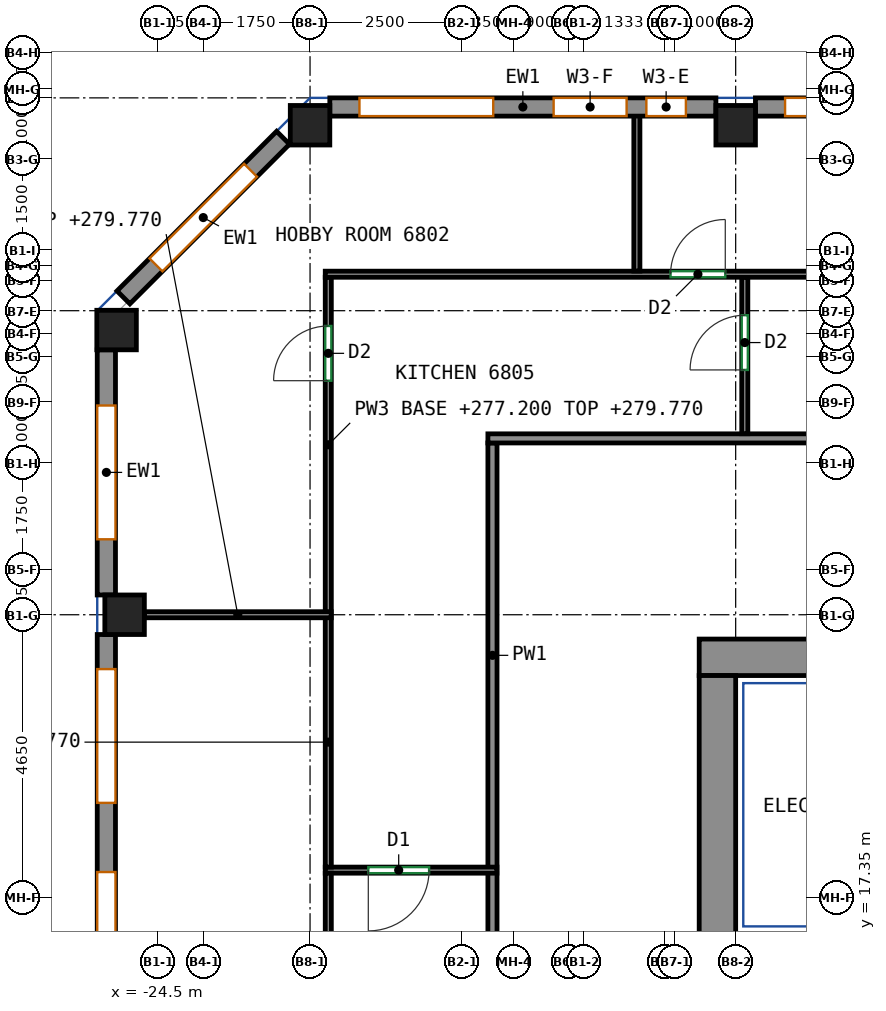
"""IFC4 building model, lengths in metres.
Left out: names, types, materials, properties, quantities, classifications, styles, units other than length and angle.
Written with IfcOpenShell. Run it as: python <this file> out.ifc"""

import sys

from ifc_helpers import new_model, si_unit, direction, frame, frame_2d, origin, origin_2d, place, context, subcontext, project, spatial, rectangle, extrude, source, transform, mapped, element, fill, save


model = new_model("IFC4")
c1 = context("Model", 3, precision=1e-05, world=origin(), true_north=direction((0.0, 1.0)))
c2 = subcontext(c1, "Body", "Model", "MODEL_VIEW")
j1 = project(units=[si_unit("LENGTHUNIT", "METRE"), si_unit("PLANEANGLEUNIT", "RADIAN")], contexts=[c1])
p1 = place(None, origin())
s1 = spatial("IfcSite", under=j1, at=p1, CompositionType="ELEMENT")
p2 = place(p1, origin())
s2 = spatial("IfcBuilding", under=s1, at=p2, CompositionType="ELEMENT")
p3 = place(p2, frame((0.0, 0.0, 277.2)))
s3 = spatial("IfcBuildingStorey", under=s2, at=p3, CompositionType="ELEMENT", Elevation=277.2)
m1 = source(origin(), c2, "Body", "SweptSolid", [
    extrude(rectangle(XDim=0.65, YDim=0.65, at=origin_2d()), origin(), (0.0, 0.0, 1.0), 3.12),
])
for number, where, z_axis, x_axis in (
    (1, (-25.182, 26.682, 0.0), (0.0, 0.0, 1.0), (1.0, 0.0, 0.0)),
    (2, (-25.05, 22.0, 0.0), (0.0, 0.0, 1.0), (1.0, 0.0, 0.0)),
    (3, (-22.0, 30.05, 0.0), (0.0, 0.0, 1.0), (1.0, 0.0, 0.0)),
    (4, (-15.0, 30.05, 0.0), (0.0, 0.0, 1.0), (1.0, 0.0, 0.0)),
):
    element("IfcColumn", number, at=place(p3, frame(where, z_axis=z_axis, x_axis=x_axis)), inside=s3, PredefinedType="COLUMN", context=c2, shape_type="MappedRepresentation", body=[
        mapped(m1, transform((0.0, 0.0, 0.0))),
    ])
m2 = source(origin(), c2, "Body", "SweptSolid", [
    extrude(rectangle(XDim=33.3, YDim=0.6, at=frame_2d((16.65, 0.0))), origin(), (0.0, 0.0, 1.0), 3.12),
])
p4 = place(p3, frame((-15.6, 21.3, 0.0), z_axis=(0.0, 0.0, 1.0), x_axis=(1.0, 0.0, 0.0)))
e5 = element("IfcWall", 5, at=p4, inside=s3, PredefinedType="SHEAR", context=c2, shape_type="MappedRepresentation", body=[
    mapped(m2, transform((0.0, 0.0, 0.0))),
])
p5 = place(p4, frame((5.708, 0.0, 0.0)))
e6 = element("IfcOpeningElement", 6, at=p5, cuts=e5, PredefinedType="OPENING", context=c2, shape_type="SweptSolid", body=[
    extrude(rectangle(XDim=0.9, YDim=2.1, at=frame_2d((0.45, 1.05))), frame((0.0, 0.31, 0.0), z_axis=(0.0, -1.0, 0.0), x_axis=(1.0, 0.0, 0.0)), (0.0, 0.0, 1.0), 0.62),
])
p6 = place(p4, frame((10.773, 0.0, 0.0)))
e7 = element("IfcOpeningElement", 7, at=p6, cuts=e5, PredefinedType="OPENING", context=c2, shape_type="SweptSolid", body=[
    extrude(rectangle(XDim=0.9, YDim=2.1, at=frame_2d((0.45, 1.05))), frame((0.0, 0.31, 0.0), z_axis=(0.0, -1.0, 0.0), x_axis=(1.0, 0.0, 0.0)), (0.0, 0.0, 1.0), 0.62),
])
p7 = place(p4, frame((15.838, 0.0, 0.0)))
e8 = element("IfcOpeningElement", 8, at=p7, cuts=e5, PredefinedType="OPENING", context=c2, shape_type="SweptSolid", body=[
    extrude(rectangle(XDim=0.9, YDim=2.1, at=frame_2d((0.45, 1.05))), frame((0.0, 0.31, 0.0), z_axis=(0.0, -1.0, 0.0), x_axis=(1.0, 0.0, 0.0)), (0.0, 0.0, 1.0), 0.62),
])
p8 = place(p4, frame((21.493, 0.0, 0.0)))
e9 = element("IfcOpeningElement", 9, at=p8, cuts=e5, PredefinedType="OPENING", context=c2, shape_type="SweptSolid", body=[
    extrude(rectangle(XDim=0.9, YDim=2.1, at=frame_2d((0.45, 1.05))), frame((0.0, 0.31, 0.0), z_axis=(0.0, -1.0, 0.0), x_axis=(1.0, 0.0, 0.0)), (0.0, 0.0, 1.0), 0.62),
])
p9 = place(p4, frame((26.92, 0.0, 0.0)))
e10 = element("IfcOpeningElement", 10, at=p9, cuts=e5, PredefinedType="OPENING", context=c2, shape_type="SweptSolid", body=[
    extrude(rectangle(XDim=0.9, YDim=2.1, at=frame_2d((0.45, 1.05))), frame((0.0, 0.31, 0.0), z_axis=(0.0, -1.0, 0.0), x_axis=(1.0, 0.0, 0.0)), (0.0, 0.0, 1.0), 0.62),
])
p10 = place(p4, frame((2.125, 0.0, 0.0)))
e11 = element("IfcOpeningElement", 11, at=p10, cuts=e5, PredefinedType="OPENING", context=c2, shape_type="SweptSolid", body=[
    extrude(rectangle(XDim=0.9, YDim=2.1, at=frame_2d((0.45, 1.05))), frame((0.0, 0.31, 0.0), z_axis=(0.0, -1.0, 0.0), x_axis=(1.0, 0.0, 0.0)), (0.0, 0.0, 1.0), 0.62),
])
p11 = place(p4, frame((30.275, 0.0, 0.0)))
e12 = element("IfcOpeningElement", 12, at=p11, cuts=e5, PredefinedType="OPENING", context=c2, shape_type="SweptSolid", body=[
    extrude(rectangle(XDim=0.9, YDim=2.1, at=frame_2d((0.45, 1.05))), frame((0.0, 0.31, 0.0), z_axis=(0.0, -1.0, 0.0), x_axis=(1.0, 0.0, 0.0)), (0.0, 0.0, 1.0), 0.62),
])
m3 = source(origin(), c2, "Body", "SweptSolid", [
    extrude(rectangle(XDim=12.0, YDim=0.6, at=frame_2d((6.0, 0.0))), origin(), (0.0, 0.0, 1.0), 3.12),
])
p12 = place(p3, frame((-15.3, 9.0, 0.0), z_axis=(0.0, 0.0, 1.0), x_axis=(0.0, 1.0, 0.0)))
e13 = element("IfcWall", 13, at=p12, inside=s3, PredefinedType="SHEAR", context=c2, shape_type="MappedRepresentation", body=[
    mapped(m3, transform((0.0, 0.0, 0.0))),
])
m4 = source(origin(), c2, "Body", "SweptSolid", [
    extrude(rectangle(XDim=6.35, YDim=0.3, at=frame_2d((3.175, 0.0))), origin(), (0.0, 0.0, 1.0), 3.12),
])
p13 = place(p3, frame((-8.325, 30.35, 0.0), z_axis=(0.0, 0.0, 1.0), x_axis=(-1.0, 0.0, 0.0)))
e14 = element("IfcWall", 14, at=p13, inside=s3, PredefinedType="SOLIDWALL", context=c2, shape_type="MappedRepresentation", body=[
    mapped(m4, transform((0.0, 0.0, 0.0))),
])
p14 = place(p13, frame((0.488, 0.0, 0.8)))
e15 = element("IfcOpeningElement", 15, at=p14, cuts=e14, PredefinedType="OPENING", context=c2, shape_type="SweptSolid", body=[
    extrude(rectangle(XDim=2.2, YDim=2.05, at=frame_2d((1.1, 1.025))), frame((0.0, 0.16, 0.0), z_axis=(0.0, -1.0, 0.0), x_axis=(1.0, 0.0, 0.0)), (0.0, 0.0, 1.0), 0.32),
])
p15 = place(p13, frame((3.663, 0.0, 0.8)))
e16 = element("IfcOpeningElement", 16, at=p15, cuts=e14, PredefinedType="OPENING", context=c2, shape_type="SweptSolid", body=[
    extrude(rectangle(XDim=2.2, YDim=2.05, at=frame_2d((1.1, 1.025))), frame((0.0, 0.16, 0.0), z_axis=(0.0, -1.0, 0.0), x_axis=(1.0, 0.0, 0.0)), (0.0, 0.0, 1.0), 0.32),
])
p16 = place(p3, frame((-15.325, 30.35, 0.0), z_axis=(0.0, 0.0, 1.0), x_axis=(-1.0, 0.0, 0.0)))
e17 = element("IfcWall", 17, at=p16, inside=s3, PredefinedType="SOLIDWALL", context=c2, shape_type="MappedRepresentation", body=[
    mapped(m4, transform((0.0, 0.0, 0.0))),
])
p17 = place(p16, frame((0.494, 0.0, 0.8)))
e18 = element("IfcOpeningElement", 18, at=p17, cuts=e17, PredefinedType="OPENING", context=c2, shape_type="SweptSolid", body=[
    extrude(rectangle(XDim=0.65, YDim=2.05, at=frame_2d((0.325, 1.025))), frame((0.0, 0.16, 0.0), z_axis=(0.0, -1.0, 0.0), x_axis=(1.0, 0.0, 0.0)), (0.0, 0.0, 1.0), 0.32),
])
p18 = place(p16, frame((3.663, 0.0, 0.8)))
e19 = element("IfcOpeningElement", 19, at=p18, cuts=e17, PredefinedType="OPENING", context=c2, shape_type="SweptSolid", body=[
    extrude(rectangle(XDim=2.2, YDim=2.05, at=frame_2d((1.1, 1.025))), frame((0.0, 0.16, 0.0), z_axis=(0.0, -1.0, 0.0), x_axis=(1.0, 0.0, 0.0)), (0.0, 0.0, 1.0), 0.32),
])
p19 = place(p16, frame((1.469, 0.0, 0.8)))
e20 = element("IfcOpeningElement", 20, at=p19, cuts=e17, PredefinedType="OPENING", context=c2, shape_type="SweptSolid", body=[
    extrude(rectangle(XDim=1.2, YDim=2.05, at=frame_2d((0.6, 1.025))), frame((0.0, 0.16, 0.0), z_axis=(0.0, -1.0, 0.0), x_axis=(1.0, 0.0, 0.0)), (0.0, 0.0, 1.0), 0.32),
])
m5 = source(origin(), c2, "Body", "SweptSolid", [
    extrude(rectangle(XDim=3.712, YDim=0.3, at=frame_2d((1.856, 0.0))), origin(), (0.0, 0.0, 1.0), 3.12),
])
p20 = place(p3, frame((-22.444, 29.844, 0.0), z_axis=(0.0, 0.0, 1.0), x_axis=(-0.707106781187, -0.707106781187, 0.0)))
e21 = element("IfcWall", 21, at=p20, inside=s3, PredefinedType="SOLIDWALL", context=c2, shape_type="MappedRepresentation", body=[
    mapped(m5, transform((0.0, 0.0, 0.0))),
])
p21 = place(p20, frame((0.756, 0.0, 0.8)))
e22 = element("IfcOpeningElement", 22, at=p21, cuts=e21, PredefinedType="OPENING", context=c2, shape_type="SweptSolid", body=[
    extrude(rectangle(XDim=2.2, YDim=2.05, at=frame_2d((1.1, 1.025))), frame((0.0, 0.16, 0.0), z_axis=(0.0, -1.0, 0.0), x_axis=(1.0, 0.0, 0.0)), (0.0, 0.0, 1.0), 0.32),
])
m6 = source(origin(), c2, "Body", "SweptSolid", [
    extrude(rectangle(XDim=4.032, YDim=0.3, at=frame_2d((2.016, 0.0))), origin(), (0.0, 0.0, 1.0), 3.12),
])
p22 = place(p3, frame((-25.35, 26.357, 0.0), z_axis=(0.0, 0.0, 1.0), x_axis=(0.0, -1.0, 0.0)))
e23 = element("IfcWall", 23, at=p22, inside=s3, PredefinedType="SOLIDWALL", context=c2, shape_type="MappedRepresentation", body=[
    mapped(m6, transform((0.0, 0.0, 0.0))),
])
p23 = place(p22, frame((0.916, 0.0, 0.8)))
e24 = element("IfcOpeningElement", 24, at=p23, cuts=e23, PredefinedType="OPENING", context=c2, shape_type="SweptSolid", body=[
    extrude(rectangle(XDim=2.2, YDim=2.05, at=frame_2d((1.1, 1.025))), frame((0.0, 0.16, 0.0), z_axis=(0.0, -1.0, 0.0), x_axis=(1.0, 0.0, 0.0)), (0.0, 0.0, 1.0), 0.32),
])
m7 = source(origin(), c2, "Body", "SweptSolid", [
    extrude(rectangle(XDim=13.35, YDim=0.3, at=frame_2d((6.675, 0.0))), origin(), (0.0, 0.0, 1.0), 3.12),
])
p24 = place(p3, frame((-25.35, 21.675, 0.0), z_axis=(0.0, 0.0, 1.0), x_axis=(0.0, -1.0, 0.0)))
e25 = element("IfcWall", 25, at=p24, inside=s3, PredefinedType="SOLIDWALL", context=c2, shape_type="MappedRepresentation", body=[
    mapped(m7, transform((0.0, 0.0, 0.0))),
])
p25 = place(p24, frame((0.569, 0.0, 0.8)))
e26 = element("IfcOpeningElement", 26, at=p25, cuts=e25, PredefinedType="OPENING", context=c2, shape_type="SweptSolid", body=[
    extrude(rectangle(XDim=2.2, YDim=2.05, at=frame_2d((1.1, 1.025))), frame((0.0, 0.16, 0.0), z_axis=(0.0, -1.0, 0.0), x_axis=(1.0, 0.0, 0.0)), (0.0, 0.0, 1.0), 0.32),
])
p26 = place(p24, frame((3.906, 0.0, 0.8)))
e27 = element("IfcOpeningElement", 27, at=p26, cuts=e25, PredefinedType="OPENING", context=c2, shape_type="SweptSolid", body=[
    extrude(rectangle(XDim=2.2, YDim=2.05, at=frame_2d((1.1, 1.025))), frame((0.0, 0.16, 0.0), z_axis=(0.0, -1.0, 0.0), x_axis=(1.0, 0.0, 0.0)), (0.0, 0.0, 1.0), 0.32),
])
p27 = place(p24, frame((7.244, 0.0, 0.8)))
e28 = element("IfcOpeningElement", 28, at=p27, cuts=e25, PredefinedType="OPENING", context=c2, shape_type="SweptSolid", body=[
    extrude(rectangle(XDim=2.2, YDim=2.05, at=frame_2d((1.1, 1.025))), frame((0.0, 0.16, 0.0), z_axis=(0.0, -1.0, 0.0), x_axis=(1.0, 0.0, 0.0)), (0.0, 0.0, 1.0), 0.32),
])
p28 = place(p24, frame((10.581, 0.0, 0.8)))
e29 = element("IfcOpeningElement", 29, at=p28, cuts=e25, PredefinedType="OPENING", context=c2, shape_type="SweptSolid", body=[
    extrude(rectangle(XDim=2.2, YDim=2.05, at=frame_2d((1.1, 1.025))), frame((0.0, 0.16, 0.0), z_axis=(0.0, -1.0, 0.0), x_axis=(1.0, 0.0, 0.0)), (0.0, 0.0, 1.0), 0.32),
])
p29 = place(p3, frame((-19.0, 8.09, 0.0), z_axis=(0.0, 0.0, 1.0), x_axis=(0.0, 1.0, 0.0)))
e30 = element("IfcWall", 30, at=p29, inside=s3, PredefinedType="PARTITIONING", context=c2, shape_type="SweptSolid", body=[
    extrude(rectangle(XDim=9.67, YDim=0.15, at=frame_2d((4.835, 0.0))), origin(), (0.0, 0.0, 1.0), 3.12),
])
p30 = place(p29, frame((3.629, 0.0, 0.0)))
e31 = element("IfcOpeningElement", 31, at=p30, cuts=e30, PredefinedType="OPENING", context=c2, shape_type="SweptSolid", body=[
    extrude(rectangle(XDim=1.0, YDim=2.1, at=frame_2d((0.5, 1.05))), frame((0.0, 0.085, 0.0), z_axis=(0.0, -1.0, 0.0), x_axis=(1.0, 0.0, 0.0)), (0.0, 0.0, 1.0), 0.17),
])
p31 = place(p3, frame((-19.0, 17.84, 0.0), z_axis=(0.0, 0.0, 1.0), x_axis=(0.0, 1.0, 0.0)))
e32 = element("IfcWall", 32, at=p31, inside=s3, PredefinedType="PARTITIONING", context=c2, shape_type="SweptSolid", body=[
    extrude(rectangle(XDim=6.985, YDim=0.15, at=frame_2d((3.492, 0.0))), origin(), (0.0, 0.0, 1.0), 3.12),
])
p32 = place(p3, frame((-19.075, 24.9, 0.0), z_axis=(0.0, 0.0, 1.0), x_axis=(1.0, 0.0, 0.0)))
e33 = element("IfcWall", 33, at=p32, inside=s3, PredefinedType="PARTITIONING", context=c2, shape_type="SweptSolid", body=[
    extrude(rectangle(XDim=39.75, YDim=0.15, at=frame_2d((19.875, 0.0))), origin(), (0.0, 0.0, 1.0), 3.12),
])
p33 = place(p32, frame((11.365, 0.0, 0.0)))
e34 = element("IfcOpeningElement", 34, at=p33, cuts=e33, PredefinedType="OPENING", context=c2, shape_type="SweptSolid", body=[
    extrude(rectangle(XDim=1.0, YDim=2.1, at=frame_2d((0.5, 1.05))), frame((0.0, 0.085, 0.0), z_axis=(0.0, -1.0, 0.0), x_axis=(1.0, 0.0, 0.0)), (0.0, 0.0, 1.0), 0.17),
])
p34 = place(p32, frame((33.379, 0.0, 0.0)))
e35 = element("IfcOpeningElement", 35, at=p34, cuts=e33, PredefinedType="OPENING", context=c2, shape_type="SweptSolid", body=[
    extrude(rectangle(XDim=0.9, YDim=2.1, at=frame_2d((0.45, 1.05))), frame((0.0, 0.085, 0.0), z_axis=(0.0, -1.0, 0.0), x_axis=(1.0, 0.0, 0.0)), (0.0, 0.0, 1.0), 0.17),
])
p35 = place(p3, frame((-18.927, 17.8, 0.0), z_axis=(0.0, 0.0, 1.0), x_axis=(-1.0, 0.0, 0.0)))
e36 = element("IfcWall", 36, at=p35, inside=s3, PredefinedType="PARTITIONING", context=c2, shape_type="SweptSolid", body=[
    extrude(rectangle(XDim=2.823, YDim=0.1, at=frame_2d((1.412, 0.0))), origin(), (0.0, 0.0, 1.0), 3.12),
])
p36 = place(p35, frame((1.115, 0.0, 0.0)))
e37 = element("IfcOpeningElement", 37, at=p36, cuts=e36, PredefinedType="OPENING", context=c2, shape_type="SweptSolid", body=[
    extrude(rectangle(XDim=1.0, YDim=2.1, at=frame_2d((0.5, 1.05))), frame((0.0, 0.06, 0.0), z_axis=(0.0, -1.0, 0.0), x_axis=(1.0, 0.0, 0.0)), (0.0, 0.0, 1.0), 0.12),
])
p37 = place(p3, frame((-21.7, 8.1, 0.0), z_axis=(0.0, 0.0, 1.0), x_axis=(0.0, 1.0, 0.0)))
e38 = element("IfcWall", 38, at=p37, inside=s3, PredefinedType="PARTITIONING", context=c2, shape_type="SweptSolid", body=[
    extrude(rectangle(XDim=9.65, YDim=0.1, at=frame_2d((4.825, 0.0))), origin(), (0.0, 0.0, 1.0), 2.57),
])
p38 = place(p37, frame((7.041, 0.0, 0.0)))
e39 = element("IfcOpeningElement", 39, at=p38, cuts=e38, PredefinedType="OPENING", context=c2, shape_type="SweptSolid", body=[
    extrude(rectangle(XDim=1.0, YDim=2.1, at=frame_2d((0.5, 1.05))), frame((0.0, 0.06, 0.0), z_axis=(0.0, -1.0, 0.0), x_axis=(1.0, 0.0, 0.0)), (0.0, 0.0, 1.0), 0.12),
])
p39 = place(p3, frame((-14.85, 24.977, 0.0), z_axis=(0.0, 0.0, 1.0), x_axis=(0.0, 1.0, 0.0)))
e40 = element("IfcWall", 40, at=p39, inside=s3, PredefinedType="PARTITIONING", context=c2, shape_type="SweptSolid", body=[
    extrude(rectangle(XDim=2.573, YDim=0.1, at=frame_2d((1.287, 0.0))), origin(), (0.0, 0.0, 1.0), 3.12),
])
p40 = place(p39, frame((1.049, 0.0, 0.0)))
e41 = element("IfcOpeningElement", 41, at=p40, cuts=e40, PredefinedType="OPENING", context=c2, shape_type="SweptSolid", body=[
    extrude(rectangle(XDim=0.9, YDim=2.1, at=frame_2d((0.45, 1.05))), frame((0.0, 0.06, 0.0), z_axis=(0.0, -1.0, 0.0), x_axis=(1.0, 0.0, 0.0)), (0.0, 0.0, 1.0), 0.12),
])
p41 = place(p3, frame((-21.7, 17.85, 0.0), z_axis=(0.0, 0.0, 1.0), x_axis=(0.0, 1.0, 0.0)))
e42 = element("IfcWall", 42, at=p41, inside=s3, PredefinedType="PARTITIONING", context=c2, shape_type="SweptSolid", body=[
    extrude(rectangle(XDim=4.11, YDim=0.1, at=frame_2d((2.055, 0.0))), origin(), (0.0, 0.0, 1.0), 2.57),
])
p42 = place(p3, frame((-21.7, 22.04, 0.0), z_axis=(0.0, 0.0, 1.0), x_axis=(0.0, 1.0, 0.0)))
e43 = element("IfcWall", 43, at=p42, inside=s3, PredefinedType="PARTITIONING", context=c2, shape_type="SweptSolid", body=[
    extrude(rectangle(XDim=5.51, YDim=0.1, at=frame_2d((2.755, 0.0))), origin(), (0.0, 0.0, 1.0), 2.57),
])
p43 = place(p42, frame((3.809, 0.0, 0.0)))
e44 = element("IfcOpeningElement", 44, at=p43, cuts=e43, PredefinedType="OPENING", context=c2, shape_type="SweptSolid", body=[
    extrude(rectangle(XDim=0.9, YDim=2.1, at=frame_2d((0.45, 1.05))), frame((0.0, 0.06, 0.0), z_axis=(0.0, -1.0, 0.0), x_axis=(1.0, 0.0, 0.0)), (0.0, 0.0, 1.0), 0.12),
])
p44 = place(p3, frame((-21.75, 27.6, 0.0), z_axis=(0.0, 0.0, 1.0), x_axis=(1.0, 0.0, 0.0)))
e45 = element("IfcWall", 45, at=p44, inside=s3, PredefinedType="PARTITIONING", context=c2, shape_type="SweptSolid", body=[
    extrude(rectangle(XDim=13.85, YDim=0.1, at=frame_2d((6.925, 0.0))), origin(), (0.0, 0.0, 1.0), 3.12),
])
p45 = place(p44, frame((5.679, 0.0, 0.0)))
e46 = element("IfcOpeningElement", 46, at=p45, cuts=e45, PredefinedType="OPENING", context=c2, shape_type="SweptSolid", body=[
    extrude(rectangle(XDim=0.9, YDim=2.1, at=frame_2d((0.45, 1.05))), frame((0.0, 0.06, 0.0), z_axis=(0.0, -1.0, 0.0), x_axis=(1.0, 0.0, 0.0)), (0.0, 0.0, 1.0), 0.12),
])
p46 = place(p3, frame((-21.652, 22.0, 0.0), z_axis=(0.0, 0.0, 1.0), x_axis=(-1.0, 0.0, 0.0)))
e47 = element("IfcWall", 47, at=p46, inside=s3, PredefinedType="PARTITIONING", context=c2, shape_type="SweptSolid", body=[
    extrude(rectangle(XDim=3.073, YDim=0.1, at=frame_2d((1.537, 0.0))), origin(), (0.0, 0.0, 1.0), 2.57),
])
p47 = place(p3, frame((-16.625, 27.652, 0.0), z_axis=(0.0, 0.0, 1.0), x_axis=(0.0, 1.0, 0.0)))
e48 = element("IfcWall", 48, at=p47, inside=s3, PredefinedType="PARTITIONING", context=c2, shape_type="SweptSolid", body=[
    extrude(rectangle(XDim=2.598, YDim=0.1, at=frame_2d((1.299, 0.0))), origin(), (0.0, 0.0, 1.0), 3.12),
])
p48 = place(p15, origin())
e49 = element("IfcWindow", 49, at=p48, inside=s3, PartitioningType="SINGLE_PANEL", PredefinedType="WINDOW", context=c2, shape_type="SweptSolid", body=[
    extrude(rectangle(XDim=2.2, YDim=2.05, at=frame_2d((1.1, 1.025))), frame((0.0, 0.03, 0.0), z_axis=(0.0, -1.0, 0.0), x_axis=(1.0, 0.0, 0.0)), (0.0, 0.0, 1.0), 0.06),
])
fill(e16, e49)
p49 = place(p17, origin())
e50 = element("IfcWindow", 50, at=p49, inside=s3, PartitioningType="SINGLE_PANEL", PredefinedType="WINDOW", context=c2, shape_type="SweptSolid", body=[
    extrude(rectangle(XDim=0.65, YDim=2.05, at=frame_2d((0.325, 1.025))), frame((0.0, 0.03, 0.0), z_axis=(0.0, -1.0, 0.0), x_axis=(1.0, 0.0, 0.0)), (0.0, 0.0, 1.0), 0.06),
])
fill(e18, e50)
p50 = place(p18, origin())
e51 = element("IfcWindow", 51, at=p50, inside=s3, PartitioningType="SINGLE_PANEL", PredefinedType="WINDOW", context=c2, shape_type="SweptSolid", body=[
    extrude(rectangle(XDim=2.2, YDim=2.05, at=frame_2d((1.1, 1.025))), frame((0.0, 0.03, 0.0), z_axis=(0.0, -1.0, 0.0), x_axis=(1.0, 0.0, 0.0)), (0.0, 0.0, 1.0), 0.06),
])
fill(e19, e51)
p51 = place(p21, origin())
e52 = element("IfcWindow", 52, at=p51, inside=s3, PartitioningType="SINGLE_PANEL", PredefinedType="WINDOW", context=c2, shape_type="SweptSolid", body=[
    extrude(rectangle(XDim=2.2, YDim=2.05, at=frame_2d((1.1, 1.025))), frame((0.0, 0.03, 0.0), z_axis=(0.0, -1.0, 0.0), x_axis=(1.0, 0.0, 0.0)), (0.0, 0.0, 1.0), 0.06),
])
fill(e22, e52)
p52 = place(p23, origin())
e53 = element("IfcWindow", 53, at=p52, inside=s3, PartitioningType="SINGLE_PANEL", PredefinedType="WINDOW", context=c2, shape_type="SweptSolid", body=[
    extrude(rectangle(XDim=2.2, YDim=2.05, at=frame_2d((1.1, 1.025))), frame((0.0, 0.03, 0.0), z_axis=(0.0, -1.0, 0.0), x_axis=(1.0, 0.0, 0.0)), (0.0, 0.0, 1.0), 0.06),
])
fill(e24, e53)
p53 = place(p25, origin())
e54 = element("IfcWindow", 54, at=p53, inside=s3, PartitioningType="SINGLE_PANEL", PredefinedType="WINDOW", context=c2, shape_type="SweptSolid", body=[
    extrude(rectangle(XDim=2.2, YDim=2.05, at=frame_2d((1.1, 1.025))), frame((0.0, 0.03, 0.0), z_axis=(0.0, -1.0, 0.0), x_axis=(1.0, 0.0, 0.0)), (0.0, 0.0, 1.0), 0.06),
])
fill(e26, e54)
p54 = place(p26, origin())
e55 = element("IfcWindow", 55, at=p54, inside=s3, PartitioningType="SINGLE_PANEL", PredefinedType="WINDOW", context=c2, shape_type="SweptSolid", body=[
    extrude(rectangle(XDim=2.2, YDim=2.05, at=frame_2d((1.1, 1.025))), frame((0.0, 0.03, 0.0), z_axis=(0.0, -1.0, 0.0), x_axis=(1.0, 0.0, 0.0)), (0.0, 0.0, 1.0), 0.06),
])
fill(e27, e55)
p55 = place(p36, origin())
e56 = element("IfcDoor", 56, at=p55, inside=s3, OperationType="SINGLE_SWING_RIGHT", PredefinedType="DOOR", context=c2, shape_type="SweptSolid", body=[
    extrude(rectangle(XDim=1.0, YDim=2.1, at=frame_2d((0.5, 1.05))), frame((0.0, 0.025, 0.0), z_axis=(0.0, -1.0, 0.0), x_axis=(1.0, 0.0, 0.0)), (0.0, 0.0, 1.0), 0.05),
])
fill(e37, e56)
p56 = place(p43, origin())
e57 = element("IfcDoor", 57, at=p56, inside=s3, OperationType="SINGLE_SWING_LEFT", PredefinedType="DOOR", context=c2, shape_type="SweptSolid", body=[
    extrude(rectangle(XDim=0.9, YDim=2.1, at=frame_2d((0.45, 1.05))), frame((0.0, 0.025, 0.0), z_axis=(0.0, -1.0, 0.0), x_axis=(1.0, 0.0, 0.0)), (0.0, 0.0, 1.0), 0.05),
])
fill(e44, e57)
p57 = place(p40, origin())
e58 = element("IfcDoor", 58, at=p57, inside=s3, OperationType="SINGLE_SWING_LEFT", PredefinedType="DOOR", context=c2, shape_type="SweptSolid", body=[
    extrude(rectangle(XDim=0.9, YDim=2.1, at=frame_2d((0.45, 1.05))), frame((0.0, 0.025, 0.0), z_axis=(0.0, -1.0, 0.0), x_axis=(1.0, 0.0, 0.0)), (0.0, 0.0, 1.0), 0.05),
])
fill(e41, e58)
p58 = place(p45, origin())
e59 = element("IfcDoor", 59, at=p58, inside=s3, OperationType="SINGLE_SWING_RIGHT", PredefinedType="DOOR", context=c2, shape_type="SweptSolid", body=[
    extrude(rectangle(XDim=0.9, YDim=2.1, at=frame_2d((0.45, 1.05))), frame((0.0, 0.025, 0.0), z_axis=(0.0, -1.0, 0.0), x_axis=(1.0, 0.0, 0.0)), (0.0, 0.0, 1.0), 0.05),
])
fill(e46, e59)
p59 = place(p19, origin())
e60 = element("IfcWindow", 60, at=p59, inside=s3, PartitioningType="SINGLE_PANEL", PredefinedType="WINDOW", context=c2, shape_type="SweptSolid", body=[
    extrude(rectangle(XDim=1.2, YDim=2.05, at=frame_2d((0.6, 1.025))), frame((0.0, 0.03, 0.0), z_axis=(0.0, -1.0, 0.0), x_axis=(1.0, 0.0, 0.0)), (0.0, 0.0, 1.0), 0.06),
])
fill(e20, e60)
save(model, sys.argv[1])
